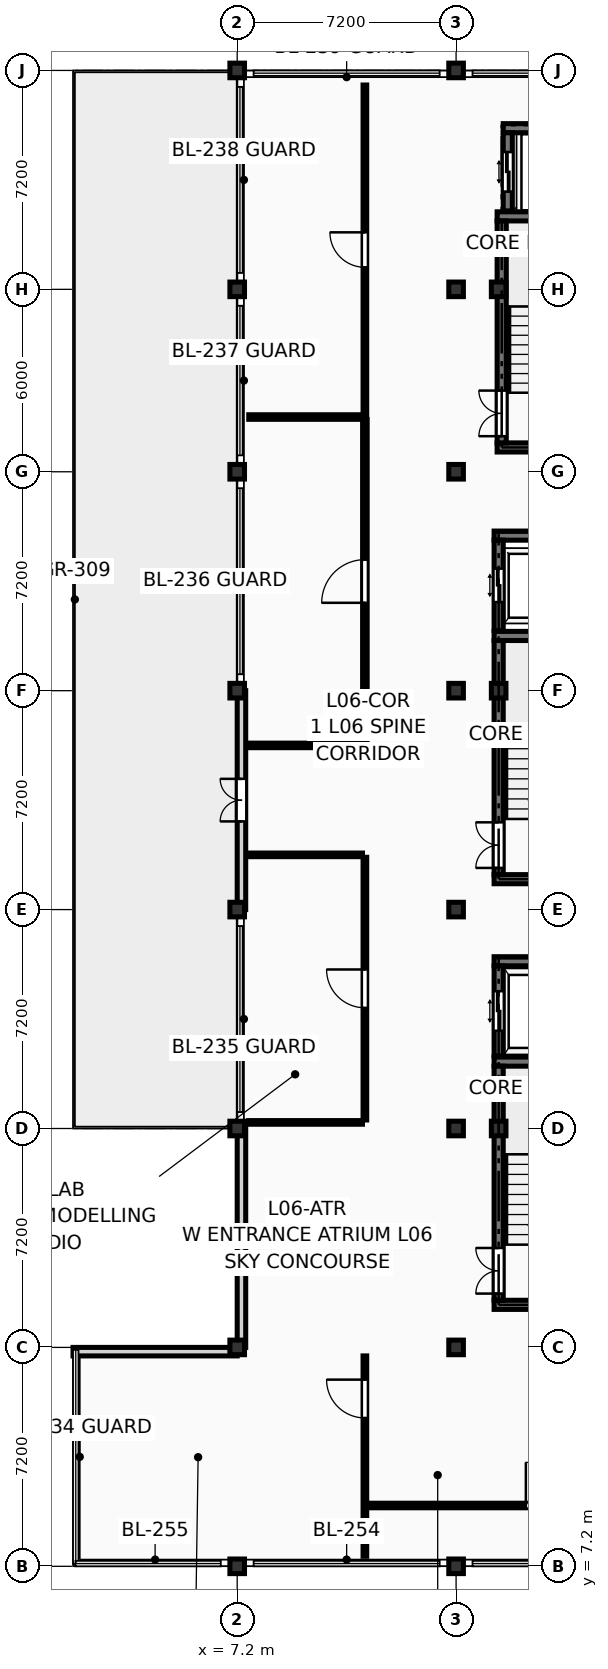
"""IFC4 building model, lengths in metres.
Left out: names, types, materials, properties, quantities, classifications, styles, units other than length and angle.
Written with IfcOpenShell. Run it as: python <this file> out.ifc"""

import sys

from ifc_helpers import new_model, si_unit, direction, frame, frame_2d, origin, origin_2d, place, context, subcontext, project, spatial, rectangle, extrude, element, fill, save


model = new_model("IFC4")
c1 = context("Model", 3, precision=1e-05, world=origin(), true_north=direction((0.0, 1.0)))
c2 = subcontext(c1, "Body", "Model", "MODEL_VIEW")
j1 = project(units=[si_unit("LENGTHUNIT", "METRE"), si_unit("PLANEANGLEUNIT", "RADIAN")], contexts=[c1])
p1 = place(None, origin())
s1 = spatial("IfcSite", under=j1, at=p1, CompositionType="ELEMENT")
p2 = place(p1, origin())
s2 = spatial("IfcBuilding", under=s1, at=p2, CompositionType="ELEMENT")
p3 = place(p2, frame((0.0, 0.0, 22.95)))
s3 = spatial("IfcBuildingStorey", under=s2, at=p3, CompositionType="ELEMENT", Elevation=22.95)
for number, where, z_axis, x_axis in (
    (1, (7.2, 7.2, 0.0), (0.0, 0.0, 1.0), (1.0, 0.0, 0.0)),
    (2, (7.2, 14.4, 0.0), (0.0, 0.0, 1.0), (1.0, 0.0, 0.0)),
    (3, (7.2, 21.6, 0.0), (0.0, 0.0, 1.0), (1.0, 0.0, 0.0)),
    (4, (7.2, 28.8, 0.0), (0.0, 0.0, 1.0), (1.0, 0.0, 0.0)),
    (5, (7.2, 36.0, 0.0), (0.0, 0.0, 1.0), (1.0, 0.0, 0.0)),
    (6, (7.2, 43.2, 0.0), (0.0, 0.0, 1.0), (1.0, 0.0, 0.0)),
    (7, (7.2, 49.2, 0.0), (0.0, 0.0, 1.0), (1.0, 0.0, 0.0)),
    (8, (7.2, 56.4, 0.0), (0.0, 0.0, 1.0), (1.0, 0.0, 0.0)),
    (9, (14.4, 7.2, 0.0), (0.0, 0.0, 1.0), (1.0, 0.0, 0.0)),
    (10, (14.4, 14.4, 0.0), (0.0, 0.0, 1.0), (1.0, 0.0, 0.0)),
    (11, (14.4, 21.6, 0.0), (0.0, 0.0, 1.0), (1.0, 0.0, 0.0)),
    (12, (14.4, 28.8, 0.0), (0.0, 0.0, 1.0), (1.0, 0.0, 0.0)),
    (13, (14.4, 36.0, 0.0), (0.0, 0.0, 1.0), (1.0, 0.0, 0.0)),
    (14, (14.4, 43.2, 0.0), (0.0, 0.0, 1.0), (1.0, 0.0, 0.0)),
    (15, (14.4, 49.2, 0.0), (0.0, 0.0, 1.0), (1.0, 0.0, 0.0)),
    (16, (14.4, 56.4, 0.0), (0.0, 0.0, 1.0), (1.0, 0.0, 0.0)),
    (17, (15.8, 21.6, 0.0), (0.0, 0.0, 1.0), (1.0, 0.0, 0.0)),
    (18, (15.8, 36.0, 0.0), (0.0, 0.0, 1.0), (1.0, 0.0, 0.0)),
    (19, (15.8, 49.2, 0.0), (0.0, 0.0, 1.0), (1.0, 0.0, 0.0)),
):
    element("IfcColumn", number, at=place(p3, frame(where, z_axis=z_axis, x_axis=x_axis)), inside=s3, PredefinedType="COLUMN", context=c2, shape_type="SweptSolid", body=[
        extrude(rectangle(XDim=0.48, YDim=0.48, at=origin_2d()), origin(), (0.0, 0.0, 1.0), 3.3),
    ])
p4 = place(p3, frame((1.8, 14.26, 0.0), z_axis=(0.0, 0.0, 1.0), x_axis=(1.0, 0.0, 0.0)))
e20 = element("IfcWall", 20, at=p4, inside=s3, PredefinedType="SOLIDWALL", context=c2, shape_type="SweptSolid", body=[
    extrude(rectangle(XDim=5.4, YDim=0.28, at=frame_2d((2.7, 0.0))), origin(), (0.0, 0.0, 1.0), 2.396),
])
p5 = place(p3, frame((7.34, 14.4, 0.0), z_axis=(0.0, 0.0, 1.0), x_axis=(0.0, 1.0, 0.0)))
e21 = element("IfcWall", 21, at=p5, inside=s3, PredefinedType="SOLIDWALL", context=c2, shape_type="SweptSolid", body=[
    extrude(rectangle(XDim=7.2, YDim=0.28, at=frame_2d((3.6, 0.0))), origin(), (0.0, 0.0, 1.0), 2.54),
])
p6 = place(p3, frame((7.34, 28.8, 0.0), z_axis=(0.0, 0.0, 1.0), x_axis=(0.0, 1.0, 0.0)))
e22 = element("IfcWall", 22, at=p6, inside=s3, PredefinedType="SOLIDWALL", context=c2, shape_type="SweptSolid", body=[
    extrude(rectangle(XDim=7.2, YDim=0.28, at=frame_2d((3.6, 0.0))), origin(), (0.0, 0.0, 1.0), 2.54),
])
p7 = place(p6, frame((2.9, 0.0, 0.0)))
e23 = element("IfcOpeningElement", 23, at=p7, cuts=e22, PredefinedType="OPENING", context=c2, shape_type="SweptSolid", body=[
    extrude(rectangle(XDim=1.4, YDim=2.2, at=frame_2d((0.7, 1.1))), frame((0.0, 0.152, 0.0), z_axis=(0.0, -1.0, 0.0), x_axis=(1.0, 0.0, 0.0)), (0.0, 0.0, 1.0), 0.304),
])
for number, where, z_axis, x_axis in (
    (24, (15.65, 15.8, 0.0), (0.0, 0.0, 1.0), (1.0, 0.0, 0.0)),
    (25, (15.65, 23.8, 0.0), (0.0, 0.0, 1.0), (1.0, 0.0, 0.0)),
):
    element("IfcWall", number, at=place(p3, frame(where, z_axis=z_axis, x_axis=x_axis)), inside=s3, PredefinedType="SHEAR", context=c2, shape_type="SweptSolid", body=[
        extrude(rectangle(XDim=4.82, YDim=0.3, at=frame_2d((2.41, 0.0))), origin(), (0.0, 0.0, 1.0), 3.09),
    ])
p8 = place(p3, frame((15.8, 15.95, 0.0), z_axis=(0.0, 0.0, 1.0), x_axis=(0.0, 1.0, 0.0)))
e26 = element("IfcWall", 26, at=p8, inside=s3, PredefinedType="SHEAR", context=c2, shape_type="SweptSolid", body=[
    extrude(rectangle(XDim=7.7, YDim=0.3, at=frame_2d((3.85, 0.0))), origin(), (0.0, 0.0, 1.0), 3.09),
])
p9 = place(p8, frame((0.22, 0.0, 0.0)))
e27 = element("IfcOpeningElement", 27, at=p9, cuts=e26, PredefinedType="OPENING", context=c2, shape_type="SweptSolid", body=[
    extrude(rectangle(XDim=1.5, YDim=2.2, at=frame_2d((0.75, 1.1))), frame((0.0, 0.162, 0.0), z_axis=(0.0, -1.0, 0.0), x_axis=(1.0, 0.0, 0.0)), (0.0, 0.0, 1.0), 0.324),
])
for number, where, z_axis, x_axis in (
    (28, (15.65, 29.8, 0.0), (0.0, 0.0, 1.0), (1.0, 0.0, 0.0)),
    (29, (15.65, 37.8, 0.0), (0.0, 0.0, 1.0), (1.0, 0.0, 0.0)),
):
    element("IfcWall", number, at=place(p3, frame(where, z_axis=z_axis, x_axis=x_axis)), inside=s3, PredefinedType="SHEAR", context=c2, shape_type="SweptSolid", body=[
        extrude(rectangle(XDim=4.82, YDim=0.3, at=frame_2d((2.41, 0.0))), origin(), (0.0, 0.0, 1.0), 3.09),
    ])
p10 = place(p3, frame((15.8, 29.95, 0.0), z_axis=(0.0, 0.0, 1.0), x_axis=(0.0, 1.0, 0.0)))
e30 = element("IfcWall", 30, at=p10, inside=s3, PredefinedType="SHEAR", context=c2, shape_type="SweptSolid", body=[
    extrude(rectangle(XDim=7.7, YDim=0.3, at=frame_2d((3.85, 0.0))), origin(), (0.0, 0.0, 1.0), 3.09),
])
p11 = place(p10, frame((0.22, 0.0, 0.0)))
e31 = element("IfcOpeningElement", 31, at=p11, cuts=e30, PredefinedType="OPENING", context=c2, shape_type="SweptSolid", body=[
    extrude(rectangle(XDim=1.5, YDim=2.2, at=frame_2d((0.75, 1.1))), frame((0.0, 0.162, 0.0), z_axis=(0.0, -1.0, 0.0), x_axis=(1.0, 0.0, 0.0)), (0.0, 0.0, 1.0), 0.324),
])
for number, where, z_axis, x_axis in (
    (32, (15.75, 44.0, 0.0), (0.0, 0.0, 1.0), (1.0, 0.0, 0.0)),
    (33, (15.75, 51.6, 0.0), (0.0, 0.0, 1.0), (1.0, 0.0, 0.0)),
):
    element("IfcWall", number, at=place(p3, frame(where, z_axis=z_axis, x_axis=x_axis)), inside=s3, PredefinedType="SHEAR", context=c2, shape_type="SweptSolid", body=[
        extrude(rectangle(XDim=4.42, YDim=0.3, at=frame_2d((2.21, 0.0))), origin(), (0.0, 0.0, 1.0), 3.09),
    ])
p12 = place(p3, frame((15.9, 44.15, 0.0), z_axis=(0.0, 0.0, 1.0), x_axis=(0.0, 1.0, 0.0)))
e34 = element("IfcWall", 34, at=p12, inside=s3, PredefinedType="SHEAR", context=c2, shape_type="SweptSolid", body=[
    extrude(rectangle(XDim=7.3, YDim=0.3, at=frame_2d((3.65, 0.0))), origin(), (0.0, 0.0, 1.0), 3.09),
])
p13 = place(p12, frame((0.22, 0.0, 0.0)))
e35 = element("IfcOpeningElement", 35, at=p13, cuts=e34, PredefinedType="OPENING", context=c2, shape_type="SweptSolid", body=[
    extrude(rectangle(XDim=1.5, YDim=2.2, at=frame_2d((0.75, 1.1))), frame((0.0, 0.162, 0.0), z_axis=(0.0, -1.0, 0.0), x_axis=(1.0, 0.0, 0.0)), (0.0, 0.0, 1.0), 0.324),
])
p14 = place(p3, frame((15.65, 27.1, 0.0), z_axis=(0.0, 0.0, 1.0), x_axis=(1.0, 0.0, 0.0)))
e36 = element("IfcWall", 36, at=p14, inside=s3, PredefinedType="SHEAR", context=c2, shape_type="SweptSolid", body=[
    extrude(rectangle(XDim=2.56, YDim=0.3, at=frame_2d((1.28, 0.0))), origin(), (0.0, 0.0, 1.0), 3.09),
])
p15 = place(p3, frame((15.8, 23.98, 0.0), z_axis=(0.0, 0.0, 1.0), x_axis=(0.0, 1.0, 0.0)))
e37 = element("IfcWall", 37, at=p15, inside=s3, PredefinedType="SHEAR", context=c2, shape_type="SweptSolid", body=[
    extrude(rectangle(XDim=2.97, YDim=0.3, at=frame_2d((1.485, 0.0))), origin(), (0.0, 0.0, 1.0), 3.09),
])
p16 = place(p15, frame((0.835, 0.0, 0.0)))
e38 = element("IfcOpeningElement", 38, at=p16, cuts=e37, PredefinedType="OPENING", context=c2, shape_type="SweptSolid", body=[
    extrude(rectangle(XDim=1.3, YDim=2.25, at=frame_2d((0.65, 1.125))), frame((0.0, 0.162, 0.0), z_axis=(0.0, -1.0, 0.0), x_axis=(1.0, 0.0, 0.0)), (0.0, 0.0, 1.0), 0.324),
])
p17 = place(p3, frame((15.65, 41.1, 0.0), z_axis=(0.0, 0.0, 1.0), x_axis=(1.0, 0.0, 0.0)))
e39 = element("IfcWall", 39, at=p17, inside=s3, PredefinedType="SHEAR", context=c2, shape_type="SweptSolid", body=[
    extrude(rectangle(XDim=2.56, YDim=0.3, at=frame_2d((1.28, 0.0))), origin(), (0.0, 0.0, 1.0), 3.09),
])
p18 = place(p3, frame((15.8, 37.98, 0.0), z_axis=(0.0, 0.0, 1.0), x_axis=(0.0, 1.0, 0.0)))
e40 = element("IfcWall", 40, at=p18, inside=s3, PredefinedType="SHEAR", context=c2, shape_type="SweptSolid", body=[
    extrude(rectangle(XDim=2.97, YDim=0.3, at=frame_2d((1.485, 0.0))), origin(), (0.0, 0.0, 1.0), 3.09),
])
p19 = place(p18, frame((0.935, 0.0, 0.0)))
e41 = element("IfcOpeningElement", 41, at=p19, cuts=e40, PredefinedType="OPENING", context=c2, shape_type="SweptSolid", body=[
    extrude(rectangle(XDim=1.1, YDim=2.2, at=frame_2d((0.55, 1.1))), frame((0.0, 0.162, 0.0), z_axis=(0.0, -1.0, 0.0), x_axis=(1.0, 0.0, 0.0)), (0.0, 0.0, 1.0), 0.324),
])
p20 = place(p3, frame((15.95, 54.5, 0.0), z_axis=(0.0, 0.0, 1.0), x_axis=(1.0, 0.0, 0.0)))
e42 = element("IfcWall", 42, at=p20, inside=s3, PredefinedType="SHEAR", context=c2, shape_type="SweptSolid", body=[
    extrude(rectangle(XDim=3.0, YDim=0.3, at=frame_2d((1.5, 0.0))), origin(), (0.0, 0.0, 1.0), 3.09),
])
p21 = place(p3, frame((16.1, 51.78, 0.0), z_axis=(0.0, 0.0, 1.0), x_axis=(0.0, 1.0, 0.0)))
e43 = element("IfcWall", 43, at=p21, inside=s3, PredefinedType="SHEAR", context=c2, shape_type="SweptSolid", body=[
    extrude(rectangle(XDim=2.57, YDim=0.3, at=frame_2d((1.285, 0.0))), origin(), (0.0, 0.0, 1.0), 3.09),
])
p22 = place(p21, frame((0.635, 0.0, 0.0)))
e44 = element("IfcOpeningElement", 44, at=p22, cuts=e43, PredefinedType="OPENING", context=c2, shape_type="SweptSolid", body=[
    extrude(rectangle(XDim=1.3, YDim=2.25, at=frame_2d((0.65, 1.125))), frame((0.0, 0.162, 0.0), z_axis=(0.0, -1.0, 0.0), x_axis=(1.0, 0.0, 0.0)), (0.0, 0.0, 1.0), 0.324),
])
p23 = place(p3, frame((11.4, 7.53, 0.0), z_axis=(0.0, 0.0, 1.0), x_axis=(0.0, 1.0, 0.0)))
e45 = element("IfcWall", 45, at=p23, inside=s3, PredefinedType="PARTITIONING", context=c2, shape_type="SweptSolid", body=[
    extrude(rectangle(XDim=6.59, YDim=0.12, at=frame_2d((3.295, 0.0))), origin(), (0.0, 0.0, 1.0), 3.075),
])
p24 = place(p23, frame((4.55, 0.0, 0.0)))
e46 = element("IfcOpeningElement", 46, at=p24, cuts=e45, PredefinedType="OPENING", context=c2, shape_type="SweptSolid", body=[
    extrude(rectangle(XDim=1.26, YDim=2.18, at=frame_2d((0.63, 1.09))), frame((0.0, 0.072, 0.0), z_axis=(0.0, -1.0, 0.0), x_axis=(1.0, 0.0, 0.0)), (0.0, 0.0, 1.0), 0.144),
])
p25 = place(p3, frame((11.5, 9.2, 0.0), z_axis=(0.0, 0.0, 1.0), x_axis=(1.0, 0.0, 0.0)))
e47 = element("IfcWall", 47, at=p25, inside=s3, PredefinedType="PARTITIONING", context=c2, shape_type="SweptSolid", body=[
    extrude(rectangle(XDim=16.82, YDim=0.15, at=frame_2d((8.41, 0.0))), origin(), (0.0, 0.0, 1.0), 3.075),
])
p26 = place(p25, frame((5.195, 0.0, 0.0)))
e48 = element("IfcOpeningElement", 48, at=p26, cuts=e47, PredefinedType="OPENING", context=c2, shape_type="SweptSolid", body=[
    extrude(rectangle(XDim=1.42, YDim=2.22, at=frame_2d((0.71, 1.11))), frame((0.0, 0.087, 0.0), z_axis=(0.0, -1.0, 0.0), x_axis=(1.0, 0.0, 0.0)), (0.0, 0.0, 1.0), 0.174),
])
p27 = place(p3, frame((7.58, 21.8, 0.0), z_axis=(0.0, 0.0, 1.0), x_axis=(1.0, 0.0, 0.0)))
e49 = element("IfcWall", 49, at=p27, inside=s3, PredefinedType="PARTITIONING", context=c2, shape_type="SweptSolid", body=[
    extrude(rectangle(XDim=3.74, YDim=0.12, at=frame_2d((1.87, 0.0))), origin(), (0.0, 0.0, 1.0), 2.415),
])
p28 = place(p3, frame((11.4, 21.88, 0.0), z_axis=(0.0, 0.0, 1.0), x_axis=(0.0, 1.0, 0.0)))
e50 = element("IfcWall", 50, at=p28, inside=s3, PredefinedType="PARTITIONING", context=c2, shape_type="SweptSolid", body=[
    extrude(rectangle(XDim=8.64, YDim=0.12, at=frame_2d((4.32, 0.0))), origin(), (0.0, 0.0, 1.0), 3.075),
])
p29 = place(p28, frame((3.69, 0.0, 0.0)))
e51 = element("IfcOpeningElement", 51, at=p29, cuts=e50, PredefinedType="OPENING", context=c2, shape_type="SweptSolid", body=[
    extrude(rectangle(XDim=1.26, YDim=2.18, at=frame_2d((0.63, 1.09))), frame((0.0, 0.072, 0.0), z_axis=(0.0, -1.0, 0.0), x_axis=(1.0, 0.0, 0.0)), (0.0, 0.0, 1.0), 0.144),
])
p30 = place(p3, frame((7.58, 30.6, 0.0), z_axis=(0.0, 0.0, 1.0), x_axis=(1.0, 0.0, 0.0)))
e52 = element("IfcWall", 52, at=p30, inside=s3, PredefinedType="PARTITIONING", context=c2, shape_type="SweptSolid", body=[
    extrude(rectangle(XDim=3.74, YDim=0.12, at=frame_2d((1.87, 0.0))), origin(), (0.0, 0.0, 1.0), 3.075),
])
p31 = place(p3, frame((7.58, 34.2, 0.0), z_axis=(0.0, 0.0, 1.0), x_axis=(1.0, 0.0, 0.0)))
e53 = element("IfcWall", 53, at=p31, inside=s3, PredefinedType="PARTITIONING", context=c2, shape_type="SweptSolid", body=[
    extrude(rectangle(XDim=3.74, YDim=0.15, at=frame_2d((1.87, 0.0))), origin(), (0.0, 0.0, 1.0), 3.075),
])
p32 = place(p3, frame((11.4, 34.28, 0.0), z_axis=(0.0, 0.0, 1.0), x_axis=(0.0, 1.0, 0.0)))
e54 = element("IfcWall", 54, at=p32, inside=s3, PredefinedType="PARTITIONING", context=c2, shape_type="SweptSolid", body=[
    extrude(rectangle(XDim=10.64, YDim=0.15, at=frame_2d((5.32, 0.0))), origin(), (0.0, 0.0, 1.0), 3.075),
])
p33 = place(p32, frame((4.61, 0.0, 0.0)))
e55 = element("IfcOpeningElement", 55, at=p33, cuts=e54, PredefinedType="OPENING", context=c2, shape_type="SweptSolid", body=[
    extrude(rectangle(XDim=1.42, YDim=2.22, at=frame_2d((0.71, 1.11))), frame((0.0, 0.087, 0.0), z_axis=(0.0, -1.0, 0.0), x_axis=(1.0, 0.0, 0.0)), (0.0, 0.0, 1.0), 0.174),
])
p34 = place(p3, frame((7.58, 45.0, 0.0), z_axis=(0.0, 0.0, 1.0), x_axis=(1.0, 0.0, 0.0)))
e56 = element("IfcWall", 56, at=p34, inside=s3, PredefinedType="PARTITIONING", context=c2, shape_type="SweptSolid", body=[
    extrude(rectangle(XDim=3.74, YDim=0.15, at=frame_2d((1.87, 0.0))), origin(), (0.0, 0.0, 1.0), 3.075),
])
p35 = place(p3, frame((11.4, 45.08, 0.0), z_axis=(0.0, 0.0, 1.0), x_axis=(0.0, 1.0, 0.0)))
e57 = element("IfcWall", 57, at=p35, inside=s3, PredefinedType="PARTITIONING", context=c2, shape_type="SweptSolid", body=[
    extrude(rectangle(XDim=10.84, YDim=0.12, at=frame_2d((5.42, 0.0))), origin(), (0.0, 0.0, 1.0), 3.075),
])
p36 = place(p35, frame((4.845, 0.0, 0.0)))
e58 = element("IfcOpeningElement", 58, at=p36, cuts=e57, PredefinedType="OPENING", context=c2, shape_type="SweptSolid", body=[
    extrude(rectangle(XDim=1.15, YDim=2.18, at=frame_2d((0.575, 1.09))), frame((0.0, 0.072, 0.0), z_axis=(0.0, -1.0, 0.0), x_axis=(1.0, 0.0, 0.0)), (0.0, 0.0, 1.0), 0.144),
])
p37 = place(p7, origin())
e59 = element("IfcDoor", 59, at=p37, inside=s3, OperationType="DOUBLE_DOOR_SINGLE_SWING", PredefinedType="DOOR", context=c2, shape_type="SweptSolid", body=[
    extrude(rectangle(XDim=1.4, YDim=2.2, at=frame_2d((0.7, 1.1))), frame((0.0, 0.025, 0.0), z_axis=(0.0, -1.0, 0.0), x_axis=(1.0, 0.0, 0.0)), (0.0, 0.0, 1.0), 0.05),
])
fill(e23, e59)
p38 = place(p9, origin())
e60 = element("IfcDoor", 60, at=p38, inside=s3, OperationType="DOUBLE_DOOR_SINGLE_SWING", PredefinedType="DOOR", context=c2, shape_type="SweptSolid", body=[
    extrude(rectangle(XDim=1.5, YDim=2.2, at=frame_2d((0.75, 1.1))), frame((0.0, 0.025, 0.0), z_axis=(0.0, -1.0, 0.0), x_axis=(1.0, 0.0, 0.0)), (0.0, 0.0, 1.0), 0.05),
])
fill(e27, e60)
p39 = place(p11, origin())
e61 = element("IfcDoor", 61, at=p39, inside=s3, OperationType="DOUBLE_DOOR_SINGLE_SWING", PredefinedType="DOOR", context=c2, shape_type="SweptSolid", body=[
    extrude(rectangle(XDim=1.5, YDim=2.2, at=frame_2d((0.75, 1.1))), frame((0.0, 0.025, 0.0), z_axis=(0.0, -1.0, 0.0), x_axis=(1.0, 0.0, 0.0)), (0.0, 0.0, 1.0), 0.05),
])
fill(e31, e61)
p40 = place(p13, origin())
e62 = element("IfcDoor", 62, at=p40, inside=s3, OperationType="DOUBLE_DOOR_SINGLE_SWING", PredefinedType="DOOR", context=c2, shape_type="SweptSolid", body=[
    extrude(rectangle(XDim=1.5, YDim=2.2, at=frame_2d((0.75, 1.1))), frame((0.0, 0.025, 0.0), z_axis=(0.0, -1.0, 0.0), x_axis=(1.0, 0.0, 0.0)), (0.0, 0.0, 1.0), 0.05),
])
fill(e35, e62)
p41 = place(p16, origin())
e63 = element("IfcDoor", 63, at=p41, inside=s3, OperationType="DOUBLE_DOOR_SLIDING", PredefinedType="DOOR", context=c2, shape_type="SweptSolid", body=[
    extrude(rectangle(XDim=1.3, YDim=2.25, at=frame_2d((0.65, 1.125))), frame((0.0, 0.025, 0.0), z_axis=(0.0, -1.0, 0.0), x_axis=(1.0, 0.0, 0.0)), (0.0, 0.0, 1.0), 0.05),
])
fill(e38, e63)
p42 = place(p19, origin())
e64 = element("IfcDoor", 64, at=p42, inside=s3, OperationType="DOUBLE_DOOR_SLIDING", PredefinedType="DOOR", context=c2, shape_type="SweptSolid", body=[
    extrude(rectangle(XDim=1.1, YDim=2.2, at=frame_2d((0.55, 1.1))), frame((0.0, 0.025, 0.0), z_axis=(0.0, -1.0, 0.0), x_axis=(1.0, 0.0, 0.0)), (0.0, 0.0, 1.0), 0.05),
])
fill(e41, e64)
p43 = place(p22, origin())
e65 = element("IfcDoor", 65, at=p43, inside=s3, OperationType="DOUBLE_DOOR_SLIDING", PredefinedType="DOOR", context=c2, shape_type="SweptSolid", body=[
    extrude(rectangle(XDim=1.3, YDim=2.25, at=frame_2d((0.65, 1.125))), frame((0.0, 0.025, 0.0), z_axis=(0.0, -1.0, 0.0), x_axis=(1.0, 0.0, 0.0)), (0.0, 0.0, 1.0), 0.05),
])
fill(e44, e65)
p44 = place(p24, origin())
e66 = element("IfcDoor", 66, at=p44, inside=s3, OperationType="SINGLE_SWING_RIGHT", PredefinedType="DOOR", context=c2, shape_type="SweptSolid", body=[
    extrude(rectangle(XDim=1.26, YDim=2.18, at=frame_2d((0.63, 1.09))), frame((0.0, 0.025, 0.0), z_axis=(0.0, -1.0, 0.0), x_axis=(1.0, 0.0, 0.0)), (0.0, 0.0, 1.0), 0.05),
])
fill(e46, e66)
p45 = place(p26, origin())
e67 = element("IfcDoor", 67, at=p45, inside=s3, OperationType="SINGLE_SWING_LEFT", PredefinedType="DOOR", context=c2, shape_type="SweptSolid", body=[
    extrude(rectangle(XDim=1.42, YDim=2.22, at=frame_2d((0.71, 1.11))), frame((0.0, 0.025, 0.0), z_axis=(0.0, -1.0, 0.0), x_axis=(1.0, 0.0, 0.0)), (0.0, 0.0, 1.0), 0.05),
])
fill(e48, e67)
p46 = place(p29, origin())
e68 = element("IfcDoor", 68, at=p46, inside=s3, OperationType="SINGLE_SWING_RIGHT", PredefinedType="DOOR", context=c2, shape_type="SweptSolid", body=[
    extrude(rectangle(XDim=1.26, YDim=2.18, at=frame_2d((0.63, 1.09))), frame((0.0, 0.025, 0.0), z_axis=(0.0, -1.0, 0.0), x_axis=(1.0, 0.0, 0.0)), (0.0, 0.0, 1.0), 0.05),
])
fill(e51, e68)
p47 = place(p33, origin())
e69 = element("IfcDoor", 69, at=p47, inside=s3, OperationType="SINGLE_SWING_LEFT", PredefinedType="DOOR", context=c2, shape_type="SweptSolid", body=[
    extrude(rectangle(XDim=1.42, YDim=2.22, at=frame_2d((0.71, 1.11))), frame((0.0, 0.025, 0.0), z_axis=(0.0, -1.0, 0.0), x_axis=(1.0, 0.0, 0.0)), (0.0, 0.0, 1.0), 0.05),
])
fill(e55, e69)
p48 = place(p36, origin())
e70 = element("IfcDoor", 70, at=p48, inside=s3, OperationType="SINGLE_SWING_RIGHT", PredefinedType="DOOR", context=c2, shape_type="SweptSolid", body=[
    extrude(rectangle(XDim=1.15, YDim=2.18, at=frame_2d((0.575, 1.09))), frame((0.0, 0.025, 0.0), z_axis=(0.0, -1.0, 0.0), x_axis=(1.0, 0.0, 0.0)), (0.0, 0.0, 1.0), 0.05),
])
fill(e58, e70)
save(model, sys.argv[1])
